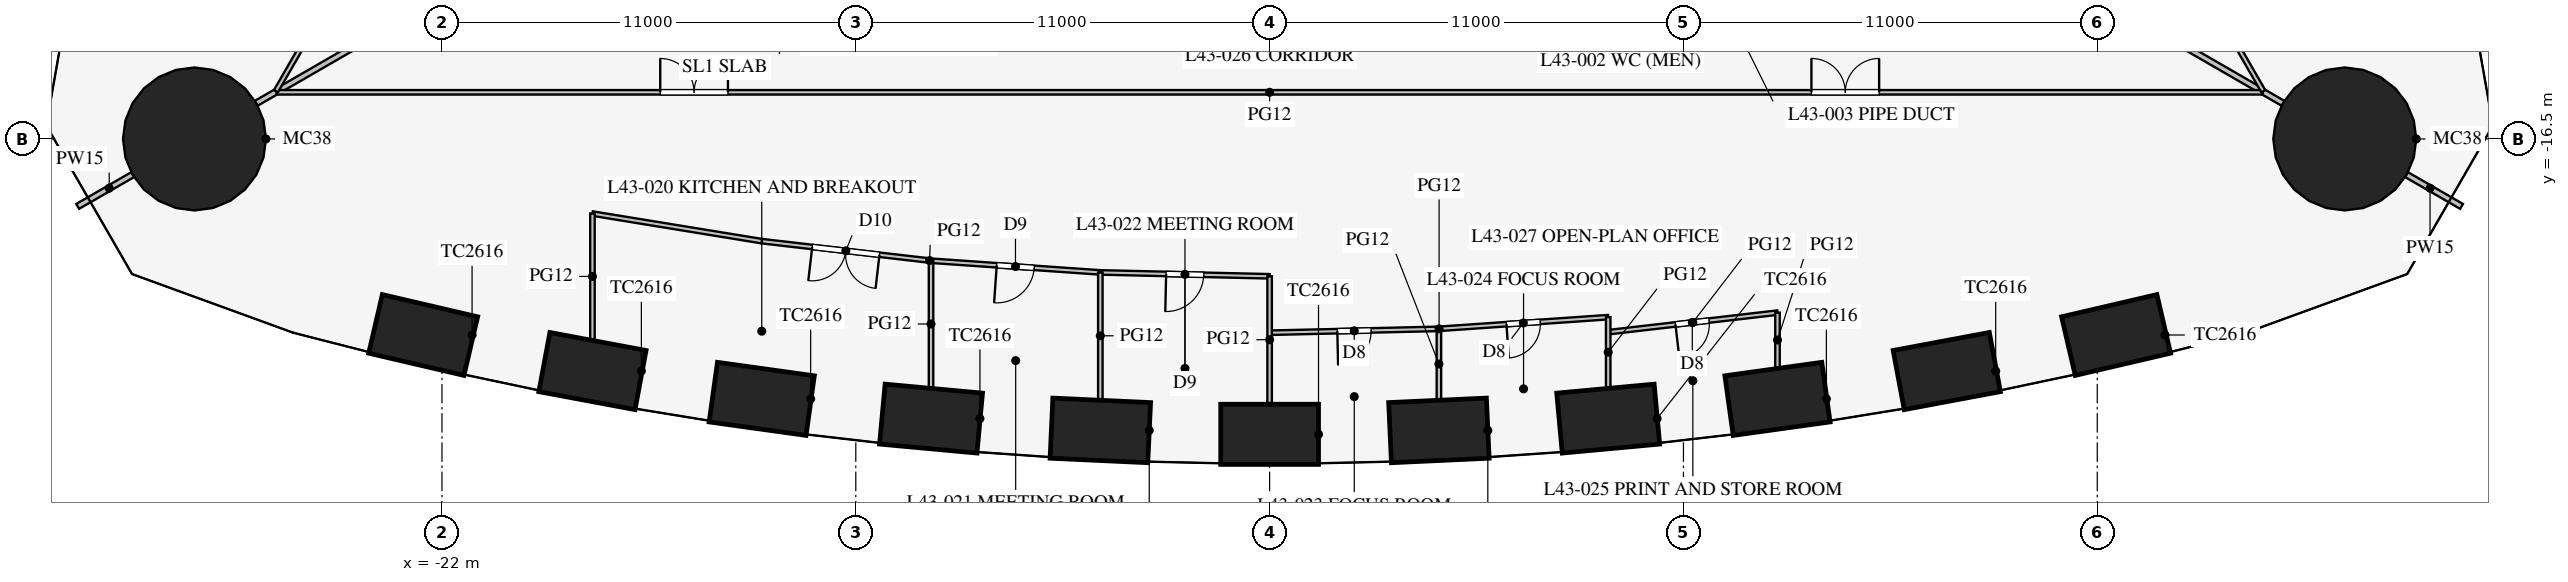
"""IFC4 building model, lengths in metres.
Left out: names, types, materials, properties, quantities, classifications, styles, units other than length and angle.
Written with IfcOpenShell. Run it as: python <this file> out.ifc"""

import sys

from ifc_helpers import new_model, si_unit, direction, frame, frame_2d, origin, origin_2d, place, context, subcontext, project, spatial, rectangle, circle, extrude, element, fill, save


model = new_model("IFC4")
c1 = context("Model", 3, precision=1e-05, world=origin(), true_north=direction((0.0, 1.0)))
c2 = subcontext(c1, "Body", "Model", "MODEL_VIEW")
j1 = project(units=[si_unit("LENGTHUNIT", "METRE"), si_unit("PLANEANGLEUNIT", "RADIAN")], contexts=[c1])
p1 = place(None, origin())
s1 = spatial("IfcSite", under=j1, at=p1, CompositionType="ELEMENT")
p2 = place(p1, origin())
s2 = spatial("IfcBuilding", under=s1, at=p2, CompositionType="ELEMENT")
p3 = place(p2, frame((0.0, 0.0, 189.7)))
s3 = spatial("IfcBuildingStorey", under=s2, at=p3, CompositionType="ELEMENT", Elevation=189.7)
for number, where, z_axis, x_axis in (
    (1, (-22.5, -21.71, 0.0), (0.0, 0.0, 1.0), (0.974, -0.227, 0.0)),
    (2, (-18.0, -22.669, 0.0), (0.0, 0.0, 1.0), (0.983, -0.184, 0.0)),
    (3, (-13.5, -23.408, 0.0), (0.0, 0.0, 1.0), (0.99, -0.138, 0.0)),
    (4, (-9.0, -23.933, 0.0), (0.0, 0.0, 1.0), (0.996, -0.092, 0.0)),
    (5, (-4.5, -24.246, 0.0), (0.0, 0.0, 1.0), (0.999, -0.046, 0.0)),
    (6, (0.0, -24.351, 0.0), (0.0, 0.0, 1.0), (1.0, 0.0, 0.0)),
    (7, (4.5, -24.246, 0.0), (0.0, 0.0, 1.0), (0.999, 0.046, 0.0)),
    (8, (9.0, -23.933, 0.0), (0.0, 0.0, 1.0), (0.996, 0.092, 0.0)),
    (9, (13.5, -23.408, 0.0), (0.0, 0.0, 1.0), (0.99, 0.138, 0.0)),
    (10, (18.0, -22.669, 0.0), (0.0, 0.0, 1.0), (0.983, 0.184, 0.0)),
    (11, (22.5, -21.71, 0.0), (0.0, 0.0, 1.0), (0.974, 0.227, 0.0)),
):
    element("IfcColumn", number, at=place(p3, frame(where, z_axis=z_axis, x_axis=x_axis)), inside=s3, PredefinedType="COLUMN", context=c2, shape_type="SweptSolid", body=[
        extrude(rectangle(XDim=2.6, YDim=1.6, at=origin_2d()), origin(), (0.0, 0.0, 1.0), 4.2),
    ])
for number, where, z_axis, x_axis in (
    (12, (28.579, -16.5, 0.0), (0.0, 0.0, 1.0), (1.0, 0.0, 0.0)),
    (13, (-28.579, -16.5, 0.0), (0.0, 0.0, 1.0), (1.0, 0.0, 0.0)),
):
    element("IfcColumn", number, at=place(p3, frame(where, z_axis=z_axis, x_axis=x_axis)), inside=s3, PredefinedType="COLUMN", context=c2, shape_type="SweptSolid", body=[
        extrude(circle(Radius=1.9, at=origin_2d()), origin(), (0.0, 0.0, 1.0), 4.2),
    ])
p4 = place(p3, frame((14.203, -8.2, 0.0), z_axis=(0.0, 0.0, 1.0), x_axis=(0.866021600284, -0.500006587798, 0.0)))
e14 = element("IfcWall", 14, at=p4, inside=s3, PredefinedType="PARTITIONING", context=c2, shape_type="SweptSolid", body=[
    extrude(rectangle(XDim=14.95, YDim=0.15, at=frame_2d((7.475, 0.0))), origin(), (0.0, 0.0, 1.0), 2.4),
])
p5 = place(p3, frame((30.008, -17.325, 0.0), z_axis=(0.0, 0.0, 1.0), x_axis=(0.866013246922, -0.500021055713, 0.0)))
e15 = element("IfcWall", 15, at=p5, inside=s3, PredefinedType="PARTITIONING", context=c2, shape_type="SweptSolid", body=[
    extrude(rectangle(XDim=1.935, YDim=0.15, at=frame_2d((0.967, 0.0))), origin(), (0.0, 0.0, 1.0), 2.4),
])
p6 = place(p3, frame((-14.203, -8.2, 0.0), z_axis=(0.0, 0.0, 1.0), x_axis=(-0.866021600284, -0.500006587798, 0.0)))
e16 = element("IfcWall", 16, at=p6, inside=s3, PredefinedType="PARTITIONING", context=c2, shape_type="SweptSolid", body=[
    extrude(rectangle(XDim=14.95, YDim=0.15, at=frame_2d((7.475, 0.0))), origin(), (0.0, 0.0, 1.0), 2.4),
])
p7 = place(p3, frame((-30.008, -17.325, 0.0), z_axis=(0.0, 0.0, 1.0), x_axis=(-0.866013246922, -0.500021055713, 0.0)))
e17 = element("IfcWall", 17, at=p7, inside=s3, PredefinedType="PARTITIONING", context=c2, shape_type="SweptSolid", body=[
    extrude(rectangle(XDim=1.935, YDim=0.15, at=frame_2d((0.967, 0.0))), origin(), (0.0, 0.0, 1.0), 2.4),
])
p8 = place(p3, frame((-26.398, -15.26, 0.0), z_axis=(0.0, 0.0, 1.0), x_axis=(1.0, 0.0, 0.0)))
e18 = element("IfcWall", 18, at=p8, inside=s3, PredefinedType="PARTITIONING", context=c2, shape_type="SweptSolid", body=[
    extrude(rectangle(XDim=52.796, YDim=0.12, at=frame_2d((26.398, 0.0))), origin(), (0.0, 0.0, 1.0), 2.9),
])
p9 = place(p8, frame((10.2, 0.0, 0.15)))
e19 = element("IfcOpeningElement", 19, at=p9, cuts=e18, PredefinedType="OPENING", context=c2, shape_type="SweptSolid", body=[
    extrude(rectangle(XDim=1.8, YDim=2.1, at=frame_2d((0.9, 1.05))), frame((0.0, 0.07, 0.0), z_axis=(0.0, -1.0, 0.0), x_axis=(1.0, 0.0, 0.0)), (0.0, 0.0, 1.0), 0.14),
])
p10 = place(p8, frame((40.8, 0.0, 0.15)))
e20 = element("IfcOpeningElement", 20, at=p10, cuts=e18, PredefinedType="OPENING", context=c2, shape_type="SweptSolid", body=[
    extrude(rectangle(XDim=1.8, YDim=2.1, at=frame_2d((0.9, 1.05))), frame((0.0, 0.07, 0.0), z_axis=(0.0, -1.0, 0.0), x_axis=(1.0, 0.0, 0.0)), (0.0, 0.0, 1.0), 0.14),
])
p11 = place(p3, frame((0.0, -21.651, 0.0), z_axis=(0.0, 0.0, 1.0), x_axis=(0.99973552509, 0.022997388381, 0.0)))
e21 = element("IfcWall", 21, at=p11, inside=s3, PredefinedType="PARTITIONING", context=c2, shape_type="SweptSolid", body=[
    extrude(rectangle(XDim=4.501, YDim=0.12, at=frame_2d((2.25, 0.0))), origin(), (0.0, 0.0, 1.0), 2.9),
])
p12 = place(p11, frame((1.8, 0.0, 0.15)))
e22 = element("IfcOpeningElement", 22, at=p12, cuts=e21, PredefinedType="OPENING", context=c2, shape_type="SweptSolid", body=[
    extrude(rectangle(XDim=0.9, YDim=2.1, at=frame_2d((0.45, 1.05))), frame((0.0, 0.07, 0.0), z_axis=(0.0, -1.0, 0.0), x_axis=(1.0, 0.0, 0.0)), (0.0, 0.0, 1.0), 0.14),
])
p13 = place(p3, frame((4.5, -21.547, 0.0), z_axis=(0.0, 0.0, 1.0), x_axis=(0.997623533978, 0.068900540297, 0.0)))
e23 = element("IfcWall", 23, at=p13, inside=s3, PredefinedType="PARTITIONING", context=c2, shape_type="SweptSolid", body=[
    extrude(rectangle(XDim=4.511, YDim=0.12, at=frame_2d((2.255, 0.0))), origin(), (0.0, 0.0, 1.0), 2.9),
])
p14 = place(p13, frame((1.8, 0.0, 0.15)))
e24 = element("IfcOpeningElement", 24, at=p14, cuts=e23, PredefinedType="OPENING", context=c2, shape_type="SweptSolid", body=[
    extrude(rectangle(XDim=0.9, YDim=2.1, at=frame_2d((0.45, 1.05))), frame((0.0, 0.07, 0.0), z_axis=(0.0, -1.0, 0.0), x_axis=(1.0, 0.0, 0.0)), (0.0, 0.0, 1.0), 0.14),
])
p15 = place(p3, frame((9.0, -21.636, 0.0), z_axis=(0.0, 0.0, 1.0), x_axis=(0.993376796464, 0.114902307404, 0.0)))
e25 = element("IfcWall", 25, at=p15, inside=s3, PredefinedType="PARTITIONING", context=c2, shape_type="SweptSolid", body=[
    extrude(rectangle(XDim=4.53, YDim=0.12, at=frame_2d((2.265, 0.0))), origin(), (0.0, 0.0, 1.0), 2.9),
])
p16 = place(p15, frame((1.8, 0.0, 0.15)))
e26 = element("IfcOpeningElement", 26, at=p16, cuts=e25, PredefinedType="OPENING", context=c2, shape_type="SweptSolid", body=[
    extrude(rectangle(XDim=0.9, YDim=2.1, at=frame_2d((0.45, 1.05))), frame((0.0, 0.07, 0.0), z_axis=(0.0, -1.0, 0.0), x_axis=(1.0, 0.0, 0.0)), (0.0, 0.0, 1.0), 0.14),
])
p17 = place(p3, frame((-13.5, -19.216, 0.0), z_axis=(0.0, 0.0, 1.0), x_axis=(0.993382946625, -0.114849124309, 0.0)))
e27 = element("IfcWall", 27, at=p17, inside=s3, PredefinedType="PARTITIONING", context=c2, shape_type="SweptSolid", body=[
    extrude(rectangle(XDim=4.53, YDim=0.12, at=frame_2d((2.265, 0.0))), origin(), (0.0, 0.0, 1.0), 2.9),
])
p18 = place(p17, frame((1.35, 0.0, 0.15)))
e28 = element("IfcOpeningElement", 28, at=p18, cuts=e27, PredefinedType="OPENING", context=c2, shape_type="SweptSolid", body=[
    extrude(rectangle(XDim=1.8, YDim=2.1, at=frame_2d((0.9, 1.05))), frame((0.0, 0.07, 0.0), z_axis=(0.0, -1.0, 0.0), x_axis=(1.0, 0.0, 0.0)), (0.0, 0.0, 1.0), 0.14),
])
p19 = place(p3, frame((-18.0, -18.483, 0.0), z_axis=(0.0, 0.0, 1.0), x_axis=(0.986986525477, -0.160802980469, 0.0)))
e29 = element("IfcWall", 29, at=p19, inside=s3, PredefinedType="PARTITIONING", context=c2, shape_type="SweptSolid", body=[
    extrude(rectangle(XDim=4.559, YDim=0.12, at=frame_2d((2.28, 0.0))), origin(), (0.0, 0.0, 1.0), 2.9),
])
p20 = place(p3, frame((-4.5, -20.047, 0.0), z_axis=(0.0, 0.0, 1.0), x_axis=(0.99973552509, -0.022997388381, 0.0)))
e30 = element("IfcWall", 30, at=p20, inside=s3, PredefinedType="PARTITIONING", context=c2, shape_type="SweptSolid", body=[
    extrude(rectangle(XDim=4.501, YDim=0.12, at=frame_2d((2.25, 0.0))), origin(), (0.0, 0.0, 1.0), 2.9),
])
p21 = place(p20, frame((1.75, 0.0, 0.15)))
e31 = element("IfcOpeningElement", 31, at=p21, cuts=e30, PredefinedType="OPENING", context=c2, shape_type="SweptSolid", body=[
    extrude(rectangle(XDim=1.0, YDim=2.1, at=frame_2d((0.5, 1.05))), frame((0.0, 0.07, 0.0), z_axis=(0.0, -1.0, 0.0), x_axis=(1.0, 0.0, 0.0)), (0.0, 0.0, 1.0), 0.14),
])
p22 = place(p3, frame((-9.0, -19.736, 0.0), z_axis=(0.0, 0.0, 1.0), x_axis=(0.997623533978, -0.068900540297, 0.0)))
e32 = element("IfcWall", 32, at=p22, inside=s3, PredefinedType="PARTITIONING", context=c2, shape_type="SweptSolid", body=[
    extrude(rectangle(XDim=4.511, YDim=0.12, at=frame_2d((2.255, 0.0))), origin(), (0.0, 0.0, 1.0), 2.9),
])
p23 = place(p22, frame((1.75, 0.0, 0.15)))
e33 = element("IfcOpeningElement", 33, at=p23, cuts=e32, PredefinedType="OPENING", context=c2, shape_type="SweptSolid", body=[
    extrude(rectangle(XDim=1.0, YDim=2.1, at=frame_2d((0.5, 1.05))), frame((0.0, 0.07, 0.0), z_axis=(0.0, -1.0, 0.0), x_axis=(1.0, 0.0, 0.0)), (0.0, 0.0, 1.0), 0.14),
])
p24 = place(p3, frame((0.0, -20.151, 0.0), z_axis=(0.0, 0.0, 1.0), x_axis=(0.0, -1.0, 0.0)))
e34 = element("IfcWall", 34, at=p24, inside=s3, PredefinedType="PARTITIONING", context=c2, shape_type="SweptSolid", body=[
    extrude(rectangle(XDim=3.37, YDim=0.12, at=frame_2d((1.685, 0.0))), origin(), (0.0, 0.0, 1.0), 2.6),
])
p25 = place(p3, frame((13.5, -21.116, 0.0), z_axis=(0.0, 0.0, 1.0), x_axis=(0.0, -1.0, 0.0)))
e35 = element("IfcWall", 35, at=p25, inside=s3, PredefinedType="PARTITIONING", context=c2, shape_type="SweptSolid", body=[
    extrude(rectangle(XDim=1.455, YDim=0.12, at=frame_2d((0.727, 0.0))), origin(), (0.0, 0.0, 1.0), 2.2),
])
p26 = place(p3, frame((4.5, -21.547, 0.0), z_axis=(0.0, 0.0, 1.0), x_axis=(0.0, -1.0, 0.0)))
e36 = element("IfcWall", 36, at=p26, inside=s3, PredefinedType="PARTITIONING", context=c2, shape_type="SweptSolid", body=[
    extrude(rectangle(XDim=1.868, YDim=0.12, at=frame_2d((0.934, 0.0))), origin(), (0.0, 0.0, 1.0), 2.6),
])
p27 = place(p3, frame((9.0, -21.236, 0.0), z_axis=(0.0, 0.0, 1.0), x_axis=(0.0, -1.0, 0.0)))
e37 = element("IfcWall", 37, at=p27, inside=s3, PredefinedType="PARTITIONING", context=c2, shape_type="SweptSolid", body=[
    extrude(rectangle(XDim=1.863, YDim=0.12, at=frame_2d((0.932, 0.0))), origin(), (0.0, 0.0, 1.0), 2.6),
])
p28 = place(p3, frame((-18.0, -18.483, 0.0), z_axis=(0.0, 0.0, 1.0), x_axis=(0.0, -1.0, 0.0)))
e38 = element("IfcWall", 38, at=p28, inside=s3, PredefinedType="PARTITIONING", context=c2, shape_type="SweptSolid", body=[
    extrude(rectangle(XDim=3.342, YDim=0.12, at=frame_2d((1.671, 0.0))), origin(), (0.0, 0.0, 1.0), 2.4),
])
p29 = place(p3, frame((-4.5, -20.047, 0.0), z_axis=(0.0, 0.0, 1.0), x_axis=(0.0, -1.0, 0.0)))
e39 = element("IfcWall", 39, at=p29, inside=s3, PredefinedType="PARTITIONING", context=c2, shape_type="SweptSolid", body=[
    extrude(rectangle(XDim=3.368, YDim=0.12, at=frame_2d((1.684, 0.0))), origin(), (0.0, 0.0, 1.0), 2.6),
])
p30 = place(p3, frame((-9.0, -19.736, 0.0), z_axis=(0.0, 0.0, 1.0), x_axis=(0.0, -1.0, 0.0)))
e40 = element("IfcWall", 40, at=p30, inside=s3, PredefinedType="PARTITIONING", context=c2, shape_type="SweptSolid", body=[
    extrude(rectangle(XDim=3.363, YDim=0.12, at=frame_2d((1.682, 0.0))), origin(), (0.0, 0.0, 1.0), 2.6),
])
p31 = place(p3, frame((26.415, -15.231, 0.0), z_axis=(0.0, 0.0, 1.0), x_axis=(-0.50000091641, 0.866024874695, 0.0)))
e41 = element("IfcWall", 41, at=p31, inside=s3, PredefinedType="PARTITIONING", context=c2, shape_type="SweptSolid", body=[
    extrude(rectangle(XDim=52.796, YDim=0.12, at=frame_2d((26.398, 0.0))), origin(), (0.0, 0.0, 1.0), 2.9),
])
p32 = place(p31, frame((10.2, 0.0, 0.15)))
e42 = element("IfcOpeningElement", 42, at=p32, cuts=e41, PredefinedType="OPENING", context=c2, shape_type="SweptSolid", body=[
    extrude(rectangle(XDim=1.8, YDim=2.1, at=frame_2d((0.9, 1.05))), frame((0.0, 0.07, 0.0), z_axis=(0.0, -1.0, 0.0), x_axis=(1.0, 0.0, 0.0)), (0.0, 0.0, 1.0), 0.14),
])
p33 = place(p31, frame((40.8, 0.0, 0.15)))
e43 = element("IfcOpeningElement", 43, at=p33, cuts=e41, PredefinedType="OPENING", context=c2, shape_type="SweptSolid", body=[
    extrude(rectangle(XDim=1.8, YDim=2.1, at=frame_2d((0.9, 1.05))), frame((0.0, 0.07, 0.0), z_axis=(0.0, -1.0, 0.0), x_axis=(1.0, 0.0, 0.0)), (0.0, 0.0, 1.0), 0.14),
])
p34 = place(p3, frame((-0.016, 30.491, 0.0), z_axis=(0.0, 0.0, 1.0), x_axis=(-0.50000091641, -0.866024874695, 0.0)))
e44 = element("IfcWall", 44, at=p34, inside=s3, PredefinedType="PARTITIONING", context=c2, shape_type="SweptSolid", body=[
    extrude(rectangle(XDim=52.796, YDim=0.12, at=frame_2d((26.398, 0.0))), origin(), (0.0, 0.0, 1.0), 2.9),
])
p35 = place(p34, frame((10.2, 0.0, 0.15)))
e45 = element("IfcOpeningElement", 45, at=p35, cuts=e44, PredefinedType="OPENING", context=c2, shape_type="SweptSolid", body=[
    extrude(rectangle(XDim=1.8, YDim=2.1, at=frame_2d((0.9, 1.05))), frame((0.0, 0.07, 0.0), z_axis=(0.0, -1.0, 0.0), x_axis=(1.0, 0.0, 0.0)), (0.0, 0.0, 1.0), 0.14),
])
p36 = place(p34, frame((40.8, 0.0, 0.15)))
e46 = element("IfcOpeningElement", 46, at=p36, cuts=e44, PredefinedType="OPENING", context=c2, shape_type="SweptSolid", body=[
    extrude(rectangle(XDim=1.8, YDim=2.1, at=frame_2d((0.9, 1.05))), frame((0.0, 0.07, 0.0), z_axis=(0.0, -1.0, 0.0), x_axis=(1.0, 0.0, 0.0)), (0.0, 0.0, 1.0), 0.14),
])
p37 = place(p18, frame((1.8, 0.0, 0.0), z_axis=(0.0, 0.0, 1.0), x_axis=(-1.0, 0.0, 0.0)))
e47 = element("IfcDoor", 47, at=p37, inside=s3, OperationType="DOUBLE_DOOR_SINGLE_SWING", PredefinedType="DOOR", context=c2, shape_type="SweptSolid", body=[
    extrude(rectangle(XDim=1.8, YDim=2.1, at=frame_2d((0.9, 1.05))), frame((0.0, 0.025, 0.0), z_axis=(0.0, -1.0, 0.0), x_axis=(1.0, 0.0, 0.0)), (0.0, 0.0, 1.0), 0.05),
])
fill(e28, e47)
p38 = place(p23, frame((1.0, 0.0, 0.0), z_axis=(0.0, 0.0, 1.0), x_axis=(-1.0, 0.0, 0.0)))
e48 = element("IfcDoor", 48, at=p38, inside=s3, OperationType="SINGLE_SWING_RIGHT", PredefinedType="DOOR", context=c2, shape_type="SweptSolid", body=[
    extrude(rectangle(XDim=1.0, YDim=2.1, at=frame_2d((0.5, 1.05))), frame((0.0, 0.025, 0.0), z_axis=(0.0, -1.0, 0.0), x_axis=(1.0, 0.0, 0.0)), (0.0, 0.0, 1.0), 0.05),
])
fill(e33, e48)
p39 = place(p21, frame((1.0, 0.0, 0.0), z_axis=(0.0, 0.0, 1.0), x_axis=(-1.0, 0.0, 0.0)))
e49 = element("IfcDoor", 49, at=p39, inside=s3, OperationType="SINGLE_SWING_RIGHT", PredefinedType="DOOR", context=c2, shape_type="SweptSolid", body=[
    extrude(rectangle(XDim=1.0, YDim=2.1, at=frame_2d((0.5, 1.05))), frame((0.0, 0.025, 0.0), z_axis=(0.0, -1.0, 0.0), x_axis=(1.0, 0.0, 0.0)), (0.0, 0.0, 1.0), 0.05),
])
fill(e31, e49)
p40 = place(p12, frame((0.9, 0.0, 0.0), z_axis=(0.0, 0.0, 1.0), x_axis=(-1.0, 0.0, 0.0)))
e50 = element("IfcDoor", 50, at=p40, inside=s3, OperationType="SINGLE_SWING_RIGHT", PredefinedType="DOOR", context=c2, shape_type="SweptSolid", body=[
    extrude(rectangle(XDim=0.9, YDim=2.1, at=frame_2d((0.45, 1.05))), frame((0.0, 0.025, 0.0), z_axis=(0.0, -1.0, 0.0), x_axis=(1.0, 0.0, 0.0)), (0.0, 0.0, 1.0), 0.05),
])
fill(e22, e50)
p41 = place(p14, frame((0.9, 0.0, 0.0), z_axis=(0.0, 0.0, 1.0), x_axis=(-1.0, 0.0, 0.0)))
e51 = element("IfcDoor", 51, at=p41, inside=s3, OperationType="SINGLE_SWING_RIGHT", PredefinedType="DOOR", context=c2, shape_type="SweptSolid", body=[
    extrude(rectangle(XDim=0.9, YDim=2.1, at=frame_2d((0.45, 1.05))), frame((0.0, 0.025, 0.0), z_axis=(0.0, -1.0, 0.0), x_axis=(1.0, 0.0, 0.0)), (0.0, 0.0, 1.0), 0.05),
])
fill(e24, e51)
p42 = place(p16, frame((0.9, 0.0, 0.0), z_axis=(0.0, 0.0, 1.0), x_axis=(-1.0, 0.0, 0.0)))
e52 = element("IfcDoor", 52, at=p42, inside=s3, OperationType="SINGLE_SWING_RIGHT", PredefinedType="DOOR", context=c2, shape_type="SweptSolid", body=[
    extrude(rectangle(XDim=0.9, YDim=2.1, at=frame_2d((0.45, 1.05))), frame((0.0, 0.025, 0.0), z_axis=(0.0, -1.0, 0.0), x_axis=(1.0, 0.0, 0.0)), (0.0, 0.0, 1.0), 0.05),
])
fill(e26, e52)
p43 = place(p9, origin())
e53 = element("IfcDoor", 53, at=p43, inside=s3, OperationType="DOUBLE_DOOR_SINGLE_SWING", PredefinedType="DOOR", context=c2, shape_type="SweptSolid", body=[
    extrude(rectangle(XDim=1.8, YDim=2.1, at=frame_2d((0.9, 1.05))), frame((0.0, 0.025, 0.0), z_axis=(0.0, -1.0, 0.0), x_axis=(1.0, 0.0, 0.0)), (0.0, 0.0, 1.0), 0.05),
])
fill(e19, e53)
p44 = place(p10, origin())
e54 = element("IfcDoor", 54, at=p44, inside=s3, OperationType="DOUBLE_DOOR_SINGLE_SWING", PredefinedType="DOOR", context=c2, shape_type="SweptSolid", body=[
    extrude(rectangle(XDim=1.8, YDim=2.1, at=frame_2d((0.9, 1.05))), frame((0.0, 0.025, 0.0), z_axis=(0.0, -1.0, 0.0), x_axis=(1.0, 0.0, 0.0)), (0.0, 0.0, 1.0), 0.05),
])
fill(e20, e54)
save(model, sys.argv[1])
